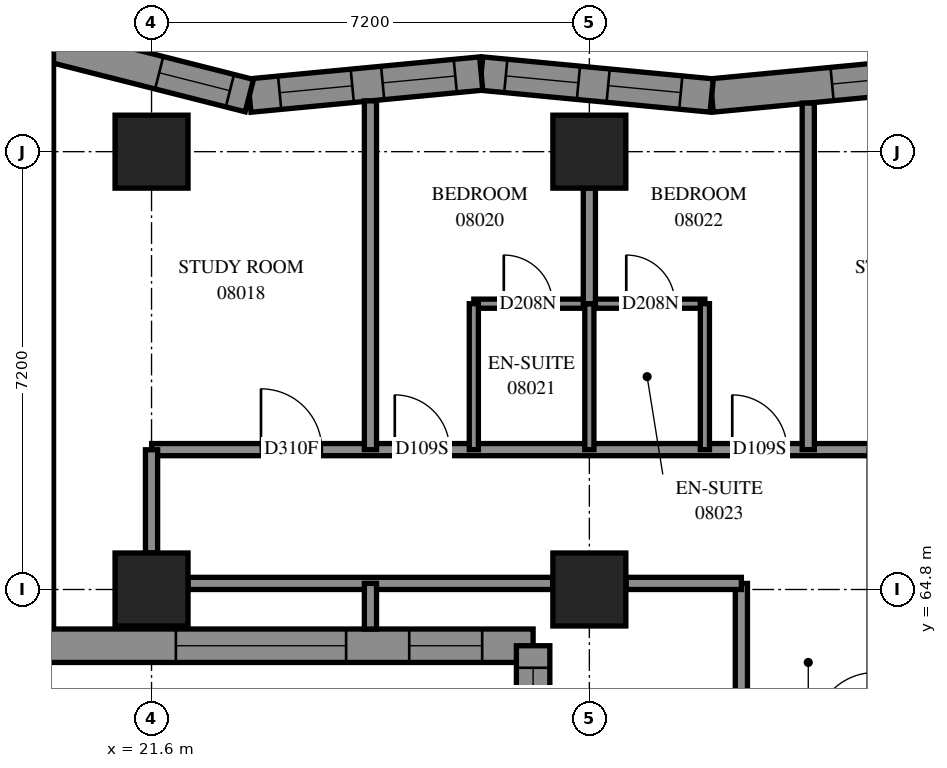
"""IFC4 building model, lengths in metres.
Left out: names, types, materials, properties, quantities, classifications, styles, units other than length and angle.
Written with IfcOpenShell. Run it as: python <this file> out.ifc"""

import sys

from ifc_helpers import new_model, si_unit, direction, frame, frame_2d, origin, origin_2d, place, context, subcontext, project, spatial, polyline, rectangle, outline, extrude, element, fill, save


model = new_model("IFC4")
c1 = context("Model", 3, precision=1e-05, world=origin(), true_north=direction((0.0, 1.0)))
c2 = subcontext(c1, "Body", "Model", "MODEL_VIEW")
j1 = project(units=[si_unit("LENGTHUNIT", "METRE"), si_unit("PLANEANGLEUNIT", "RADIAN")], contexts=[c1])
p1 = place(None, origin())
s1 = spatial("IfcSite", under=j1, at=p1, CompositionType="ELEMENT")
p2 = place(p1, origin())
s2 = spatial("IfcBuilding", under=s1, at=p2, CompositionType="ELEMENT")
p3 = place(p2, frame((0.0, 0.0, 33.8)))
s3 = spatial("IfcBuildingStorey", under=s2, at=p3, CompositionType="ELEMENT", Elevation=33.8)
for number, where, z_axis, x_axis in (
    (1, (21.6, 64.8, 0.0), (0.0, 0.0, 1.0), (1.0, 0.0, 0.0)),
    (2, (21.6, 72.0, 0.0), (0.0, 0.0, 1.0), (1.0, 0.0, 0.0)),
    (3, (28.8, 64.8, 0.0), (0.0, 0.0, 1.0), (1.0, 0.0, 0.0)),
    (4, (28.8, 72.0, 0.0), (0.0, 0.0, 1.0), (1.0, 0.0, 0.0)),
):
    element("IfcColumn", number, at=place(p3, frame(where, z_axis=z_axis, x_axis=x_axis)), inside=s3, PredefinedType="COLUMN", context=c2, shape_type="SweptSolid", body=[
        extrude(rectangle(XDim=1.2, YDim=1.2, at=origin_2d()), origin(), (0.0, 0.0, 1.0), 3.1),
    ])
p4 = place(p3, frame((34.603, 73.285, 0.0), z_axis=(0.0, 0.0, 1.0), x_axis=(-0.9954966527, -0.0947967005, 0.0)))
e5 = element("IfcWall", 5, at=p4, inside=s3, PredefinedType="SOLIDWALL", context=c2, shape_type="SweptSolid", body=[
    extrude(outline(polyline([(-0.026, -0.275), (3.782, -0.275), (3.834, 0.275), (0.026, 0.275), (-0.026, -0.275)])), origin(), (0.0, 0.0, 1.0), 3.1),
])
p5 = place(p4, frame((0.62, 0.0, 0.5)))
e6 = element("IfcOpeningElement", 6, at=p5, cuts=e5, PredefinedType="OPENING", context=c2, shape_type="SweptSolid", body=[
    extrude(rectangle(XDim=1.2, YDim=2.45, at=frame_2d((0.6, 1.225))), frame((0.0, 0.285, 0.0), z_axis=(0.0, -1.0, 0.0), x_axis=(1.0, 0.0, 0.0)), (0.0, 0.0, 1.0), 0.57),
])
p6 = place(p3, frame((30.812, 72.924, 0.0), z_axis=(0.0, 0.0, 1.0), x_axis=(-0.9954966527, 0.0947967005, 0.0)))
e7 = element("IfcWall", 7, at=p6, inside=s3, PredefinedType="SOLIDWALL", context=c2, shape_type="SweptSolid", body=[
    extrude(outline(polyline([(0.026, -0.275), (3.834, -0.275), (3.782, 0.275), (-0.026, 0.275), (0.026, -0.275)])), origin(), (0.0, 0.0, 1.0), 3.1),
])
p7 = place(p6, frame((0.511, 0.0, 0.5)))
e8 = element("IfcOpeningElement", 8, at=p7, cuts=e7, PredefinedType="OPENING", context=c2, shape_type="SweptSolid", body=[
    extrude(rectangle(XDim=1.2, YDim=2.45, at=frame_2d((0.6, 1.225))), frame((0.0, 0.285, 0.0), z_axis=(0.0, -1.0, 0.0), x_axis=(1.0, 0.0, 0.0)), (0.0, 0.0, 1.0), 0.57),
])
p8 = place(p6, frame((2.202, 0.0, 0.5)))
e9 = element("IfcOpeningElement", 9, at=p8, cuts=e7, PredefinedType="OPENING", context=c2, shape_type="SweptSolid", body=[
    extrude(rectangle(XDim=1.2, YDim=2.45, at=frame_2d((0.6, 1.225))), frame((0.0, 0.285, 0.0), z_axis=(0.0, -1.0, 0.0), x_axis=(1.0, 0.0, 0.0)), (0.0, 0.0, 1.0), 0.57),
])
p9 = place(p3, frame((27.021, 73.285, 0.0), z_axis=(0.0, 0.0, 1.0), x_axis=(-0.9954951205, -0.0948127894, 0.0)))
e10 = element("IfcWall", 10, at=p9, inside=s3, PredefinedType="SOLIDWALL", context=c2, shape_type="SweptSolid", body=[
    extrude(outline(polyline([(-0.026, -0.275), (3.782, -0.275), (3.877, 0.275), (0.026, 0.275), (-0.026, -0.275)])), origin(), (0.0, 0.0, 1.0), 3.1),
])
p10 = place(p9, frame((0.428, 0.0, 0.5)))
e11 = element("IfcOpeningElement", 11, at=p10, cuts=e10, PredefinedType="OPENING", context=c2, shape_type="SweptSolid", body=[
    extrude(rectangle(XDim=1.2, YDim=2.45, at=frame_2d((0.6, 1.225))), frame((0.0, 0.285, 0.0), z_axis=(0.0, -1.0, 0.0), x_axis=(1.0, 0.0, 0.0)), (0.0, 0.0, 1.0), 0.57),
])
p11 = place(p9, frame((2.129, 0.0, 0.5)))
e12 = element("IfcOpeningElement", 12, at=p11, cuts=e10, PredefinedType="OPENING", context=c2, shape_type="SweptSolid", body=[
    extrude(rectangle(XDim=1.2, YDim=2.45, at=frame_2d((0.6, 1.225))), frame((0.0, 0.285, 0.0), z_axis=(0.0, -1.0, 0.0), x_axis=(1.0, 0.0, 0.0)), (0.0, 0.0, 1.0), 0.57),
])
p12 = place(p3, frame((23.209, 72.922, 0.0), z_axis=(0.0, 0.0, 1.0), x_axis=(-0.9693377173, 0.2457323539, 0.0)))
e13 = element("IfcWall", 13, at=p12, inside=s3, PredefinedType="SOLIDWALL", context=c2, shape_type="SweptSolid", body=[
    extrude(outline(polyline([(0.048, -0.275), (3.959, -0.275), (3.252, 0.275), (-0.048, 0.275), (0.048, -0.275)])), origin(), (0.0, 0.0, 1.0), 3.1),
])
p13 = place(p12, frame((0.33, 0.0, 0.5)))
e14 = element("IfcOpeningElement", 14, at=p13, cuts=e13, PredefinedType="OPENING", context=c2, shape_type="SweptSolid", body=[
    extrude(rectangle(XDim=1.2, YDim=2.45, at=frame_2d((0.6, 1.225))), frame((0.0, 0.285, 0.0), z_axis=(0.0, -1.0, 0.0), x_axis=(1.0, 0.0, 0.0)), (0.0, 0.0, 1.0), 0.57),
])
p14 = place(p3, frame((19.714, 73.808, 0.0), z_axis=(0.0, 0.0, 1.0), x_axis=(0.0, -1.0, 0.0)))
e15 = element("IfcWall", 15, at=p14, inside=s3, PredefinedType="SOLIDWALL", context=c2, shape_type="SweptSolid", body=[
    extrude(outline(polyline([(-0.353, -0.275), (10.208, -0.275), (9.658, 0.275), (0.353, 0.275), (-0.353, -0.275)])), origin(), (0.0, 0.0, 1.0), 3.1),
])
p15 = place(p14, frame((2.208, 0.0, 0.5)))
e16 = element("IfcOpeningElement", 16, at=p15, cuts=e15, PredefinedType="OPENING", context=c2, shape_type="SweptSolid", body=[
    extrude(rectangle(XDim=2.8, YDim=2.45, at=frame_2d((1.4, 1.225))), frame((0.0, 0.285, 0.0), z_axis=(0.0, -1.0, 0.0), x_axis=(1.0, 0.0, 0.0)), (0.0, 0.0, 1.0), 0.57),
])
p16 = place(p14, frame((5.808, 0.0, 0.5)))
e17 = element("IfcOpeningElement", 17, at=p16, cuts=e15, PredefinedType="OPENING", context=c2, shape_type="SweptSolid", body=[
    extrude(rectangle(XDim=2.8, YDim=2.45, at=frame_2d((1.4, 1.225))), frame((0.0, 0.285, 0.0), z_axis=(0.0, -1.0, 0.0), x_axis=(1.0, 0.0, 0.0)), (0.0, 0.0, 1.0), 0.57),
])
p17 = place(p3, frame((19.714, 63.875, 0.0), z_axis=(0.0, 0.0, 1.0), x_axis=(1.0, 0.0, 0.0)))
e18 = element("IfcWall", 18, at=p17, inside=s3, PredefinedType="SOLIDWALL", context=c2, shape_type="SweptSolid", body=[
    extrude(outline(polyline([(-0.275, -0.275), (7.886, -0.275), (8.436, 0.275), (0.275, 0.275), (-0.275, -0.275)])), origin(), (0.0, 0.0, 1.0), 3.1),
])
p18 = place(p17, frame((2.286, 0.0, 0.5)))
e19 = element("IfcOpeningElement", 19, at=p18, cuts=e18, PredefinedType="OPENING", context=c2, shape_type="SweptSolid", body=[
    extrude(rectangle(XDim=2.8, YDim=2.45, at=frame_2d((1.4, 1.225))), frame((0.0, 0.285, 0.0), z_axis=(0.0, -1.0, 0.0), x_axis=(1.0, 0.0, 0.0)), (0.0, 0.0, 1.0), 0.57),
])
p19 = place(p17, frame((6.123, 0.0, 0.5)))
e20 = element("IfcOpeningElement", 20, at=p19, cuts=e18, PredefinedType="OPENING", context=c2, shape_type="SweptSolid", body=[
    extrude(rectangle(XDim=1.2, YDim=2.45, at=frame_2d((0.6, 1.225))), frame((0.0, 0.285, 0.0), z_axis=(0.0, -1.0, 0.0), x_axis=(1.0, 0.0, 0.0)), (0.0, 0.0, 1.0), 0.57),
])
p20 = place(p3, frame((27.875, 63.875, 0.0), z_axis=(0.0, 0.0, 1.0), x_axis=(0.0, -1.0, 0.0)))
e21 = element("IfcWall", 21, at=p20, inside=s3, PredefinedType="SOLIDWALL", context=c2, shape_type="SweptSolid", body=[
    extrude(outline(polyline([(0.275, -0.275), (7.475, -0.275), (6.925, 0.275), (-0.275, 0.275), (0.275, -0.275)])), origin(), (0.0, 0.0, 1.0), 3.1),
])
p21 = place(p20, frame((3.975, 0.0, 0.7)))
e22 = element("IfcOpeningElement", 22, at=p21, cuts=e21, PredefinedType="OPENING", context=c2, shape_type="SweptSolid", body=[
    extrude(rectangle(XDim=1.8, YDim=2.2, at=frame_2d((0.9, 1.1))), frame((0.0, 0.285, 0.0), z_axis=(0.0, -1.0, 0.0), x_axis=(1.0, 0.0, 0.0)), (0.0, 0.0, 1.0), 0.57),
])
p22 = place(p20, frame((0.362, 0.0, 0.45)))
e23 = element("IfcOpeningElement", 23, at=p22, cuts=e21, PredefinedType="OPENING", context=c2, shape_type="SweptSolid", body=[
    extrude(rectangle(XDim=1.0, YDim=2.5, at=frame_2d((0.5, 1.25))), frame((0.0, 0.285, 0.0), z_axis=(0.0, -1.0, 0.0), x_axis=(1.0, 0.0, 0.0)), (0.0, 0.0, 1.0), 0.57),
])
p23 = place(p20, frame((2.2, 0.0, 0.5)))
e24 = element("IfcOpeningElement", 24, at=p23, cuts=e21, PredefinedType="OPENING", context=c2, shape_type="SweptSolid", body=[
    extrude(rectangle(XDim=1.2, YDim=2.45, at=frame_2d((0.6, 1.225))), frame((0.0, 0.285, 0.0), z_axis=(0.0, -1.0, 0.0), x_axis=(1.0, 0.0, 0.0)), (0.0, 0.0, 1.0), 0.57),
])
p24 = place(p3, frame((21.602, 67.1, 0.0), z_axis=(0.0, 0.0, 1.0), x_axis=(1.0, 0.0, 0.0)))
e25 = element("IfcWall", 25, at=p24, inside=s3, PredefinedType="PARTITIONING", context=c2, shape_type="SweptSolid", body=[
    extrude(rectangle(XDim=11.898, YDim=0.2, at=frame_2d((5.949, 0.0))), origin(), (0.0, 0.0, 1.0), 3.1),
])
p25 = place(p24, frame((1.798, 0.0, 0.0)))
e26 = element("IfcOpeningElement", 26, at=p25, cuts=e25, PredefinedType="OPENING", context=c2, shape_type="SweptSolid", body=[
    extrude(rectangle(XDim=1.0, YDim=2.1, at=frame_2d((0.5, 1.05))), frame((0.0, 0.11, 0.0), z_axis=(0.0, -1.0, 0.0), x_axis=(1.0, 0.0, 0.0)), (0.0, 0.0, 1.0), 0.22),
])
p26 = place(p24, frame((3.998, 0.0, 0.0)))
e27 = element("IfcOpeningElement", 27, at=p26, cuts=e25, PredefinedType="OPENING", context=c2, shape_type="SweptSolid", body=[
    extrude(rectangle(XDim=0.9, YDim=2.1, at=frame_2d((0.45, 1.05))), frame((0.0, 0.11, 0.0), z_axis=(0.0, -1.0, 0.0), x_axis=(1.0, 0.0, 0.0)), (0.0, 0.0, 1.0), 0.22),
])
p27 = place(p24, frame((9.548, 0.0, 0.0)))
e28 = element("IfcOpeningElement", 28, at=p27, cuts=e25, PredefinedType="OPENING", context=c2, shape_type="SweptSolid", body=[
    extrude(rectangle(XDim=0.9, YDim=2.1, at=frame_2d((0.45, 1.05))), frame((0.0, 0.11, 0.0), z_axis=(0.0, -1.0, 0.0), x_axis=(1.0, 0.0, 0.0)), (0.0, 0.0, 1.0), 0.22),
])
p28 = place(p3, frame((22.2, 64.9, 0.0), z_axis=(0.0, 0.0, 1.0), x_axis=(1.0, 0.0, 0.0)))
e29 = element("IfcWall", 29, at=p28, inside=s3, PredefinedType="PARTITIONING", context=c2, shape_type="SweptSolid", body=[
    extrude(rectangle(XDim=6.0, YDim=0.2, at=frame_2d((3.0, 0.0))), origin(), (0.0, 0.0, 1.0), 2.6),
])
p29 = place(p3, frame((25.2, 67.1, 0.0), z_axis=(0.0, 0.0, 1.0), x_axis=(0.0, 1.0, 0.0)))
e30 = element("IfcWall", 30, at=p29, inside=s3, PredefinedType="PARTITIONING", context=c2, shape_type="SweptSolid", body=[
    extrude(rectangle(XDim=5.735, YDim=0.2, at=frame_2d((2.868, 0.0))), origin(), (0.0, 0.0, 1.0), 3.1),
])
p30 = place(p3, frame((32.4, 67.1, 0.0), z_axis=(0.0, 0.0, 1.0), x_axis=(0.0, 1.0, 0.0)))
e31 = element("IfcWall", 31, at=p30, inside=s3, PredefinedType="PARTITIONING", context=c2, shape_type="SweptSolid", body=[
    extrude(rectangle(XDim=5.699, YDim=0.2, at=frame_2d((2.849, 0.0))), origin(), (0.0, 0.0, 1.0), 3.1),
])
p31 = place(p3, frame((26.9, 69.5, 0.0), z_axis=(0.0, 0.0, 1.0), x_axis=(1.0, 0.0, 0.0)))
e32 = element("IfcWall", 32, at=p31, inside=s3, PredefinedType="PARTITIONING", context=c2, shape_type="SweptSolid", body=[
    extrude(rectangle(XDim=3.8, YDim=0.15, at=frame_2d((1.9, 0.0))), origin(), (0.0, 0.0, 1.0), 3.1),
])
p32 = place(p31, frame((0.493, 0.0, 0.0)))
e33 = element("IfcOpeningElement", 33, at=p32, cuts=e32, PredefinedType="OPENING", context=c2, shape_type="SweptSolid", body=[
    extrude(rectangle(XDim=0.8, YDim=2.1, at=frame_2d((0.4, 1.05))), frame((0.0, 0.085, 0.0), z_axis=(0.0, -1.0, 0.0), x_axis=(1.0, 0.0, 0.0)), (0.0, 0.0, 1.0), 0.17),
])
p33 = place(p31, frame((2.507, 0.0, 0.0)))
e34 = element("IfcOpeningElement", 34, at=p33, cuts=e32, PredefinedType="OPENING", context=c2, shape_type="SweptSolid", body=[
    extrude(rectangle(XDim=0.8, YDim=2.1, at=frame_2d((0.4, 1.05))), frame((0.0, 0.085, 0.0), z_axis=(0.0, -1.0, 0.0), x_axis=(1.0, 0.0, 0.0)), (0.0, 0.0, 1.0), 0.17),
])
p34 = place(p3, frame((31.3, 62.302, 0.0), z_axis=(0.0, 0.0, 1.0), x_axis=(0.0, 1.0, 0.0)))
e35 = element("IfcWall", 35, at=p34, inside=s3, PredefinedType="PARTITIONING", context=c2, shape_type="SweptSolid", body=[
    extrude(rectangle(XDim=2.598, YDim=0.2, at=frame_2d((1.299, 0.0))), origin(), (0.0, 0.0, 1.0), 3.1),
])
for number, where, z_axis, x_axis in (
    (36, (26.9, 67.1, 0.0), (0.0, 0.0, 1.0), (0.0, 1.0, 0.0)),
    (37, (28.8, 67.1, 0.0), (0.0, 0.0, 1.0), (0.0, 1.0, 0.0)),
    (38, (30.7, 67.1, 0.0), (0.0, 0.0, 1.0), (0.0, 1.0, 0.0)),
):
    element("IfcWall", number, at=place(p3, frame(where, z_axis=z_axis, x_axis=x_axis)), inside=s3, PredefinedType="PARTITIONING", context=c2, shape_type="SweptSolid", body=[
        extrude(rectangle(XDim=2.4, YDim=0.15, at=frame_2d((1.2, 0.0))), origin(), (0.0, 0.0, 1.0), 3.1),
    ])
for number, where, z_axis, x_axis in (
    (39, (28.8, 69.5, 0.0), (0.0, 0.0, 1.0), (0.0, 1.0, 0.0)),
    (40, (29.4, 64.9, 0.0), (0.0, 0.0, 1.0), (1.0, 0.0, 0.0)),
):
    element("IfcWall", number, at=place(p3, frame(where, z_axis=z_axis, x_axis=x_axis)), inside=s3, PredefinedType="PARTITIONING", context=c2, shape_type="SweptSolid", body=[
        extrude(rectangle(XDim=1.9, YDim=0.2, at=frame_2d((0.95, 0.0))), origin(), (0.0, 0.0, 1.0), 3.1),
    ])
p35 = place(p3, frame((21.6, 65.4, 0.0), z_axis=(0.0, 0.0, 1.0), x_axis=(0.0, 1.0, 0.0)))
e41 = element("IfcWall", 41, at=p35, inside=s3, PredefinedType="PARTITIONING", context=c2, shape_type="SweptSolid", body=[
    extrude(rectangle(XDim=1.698, YDim=0.2, at=frame_2d((0.849, 0.0))), origin(), (0.0, 0.0, 1.0), 2.6),
])
p36 = place(p3, frame((25.2, 64.15, 0.0), z_axis=(0.0, 0.0, 1.0), x_axis=(0.0, 1.0, 0.0)))
e42 = element("IfcWall", 42, at=p36, inside=s3, PredefinedType="PARTITIONING", context=c2, shape_type="SweptSolid", body=[
    extrude(rectangle(XDim=0.75, YDim=0.2, at=frame_2d((0.375, 0.0))), origin(), (0.0, 0.0, 1.0), 3.1),
])
p37 = place(p3, frame((28.2, 64.9, 0.0), z_axis=(0.0, 0.0, 1.0), x_axis=(1.0, 0.0, 0.0)))
e43 = element("IfcWall", 43, at=p37, inside=s3, PredefinedType="PARTITIONING", context=c2, shape_type="SweptSolid", body=[
    extrude(rectangle(XDim=1.2, YDim=0.2, at=frame_2d((0.6, 0.0))), origin(), (0.0, 0.0, 1.0), 3.1),
])
p38 = place(p5, origin())
e44 = element("IfcWindow", 44, at=p38, inside=s3, PartitioningType="SINGLE_PANEL", PredefinedType="WINDOW", context=c2, shape_type="SweptSolid", body=[
    extrude(rectangle(XDim=1.2, YDim=2.45, at=frame_2d((0.6, 1.225))), frame((0.0, 0.155, 0.0), z_axis=(0.0, -1.0, 0.0), x_axis=(1.0, 0.0, 0.0)), (0.0, 0.0, 1.0), 0.06),
])
fill(e6, e44)
p39 = place(p7, origin())
e45 = element("IfcWindow", 45, at=p39, inside=s3, PartitioningType="SINGLE_PANEL", PredefinedType="WINDOW", context=c2, shape_type="SweptSolid", body=[
    extrude(rectangle(XDim=1.2, YDim=2.45, at=frame_2d((0.6, 1.225))), frame((0.0, 0.155, 0.0), z_axis=(0.0, -1.0, 0.0), x_axis=(1.0, 0.0, 0.0)), (0.0, 0.0, 1.0), 0.06),
])
fill(e8, e45)
p40 = place(p8, origin())
e46 = element("IfcWindow", 46, at=p40, inside=s3, PartitioningType="SINGLE_PANEL", PredefinedType="WINDOW", context=c2, shape_type="SweptSolid", body=[
    extrude(rectangle(XDim=1.2, YDim=2.45, at=frame_2d((0.6, 1.225))), frame((0.0, 0.155, 0.0), z_axis=(0.0, -1.0, 0.0), x_axis=(1.0, 0.0, 0.0)), (0.0, 0.0, 1.0), 0.06),
])
fill(e9, e46)
p41 = place(p10, origin())
e47 = element("IfcWindow", 47, at=p41, inside=s3, PartitioningType="SINGLE_PANEL", PredefinedType="WINDOW", context=c2, shape_type="SweptSolid", body=[
    extrude(rectangle(XDim=1.2, YDim=2.45, at=frame_2d((0.6, 1.225))), frame((0.0, 0.155, 0.0), z_axis=(0.0, -1.0, 0.0), x_axis=(1.0, 0.0, 0.0)), (0.0, 0.0, 1.0), 0.06),
])
fill(e11, e47)
p42 = place(p11, origin())
e48 = element("IfcWindow", 48, at=p42, inside=s3, PartitioningType="SINGLE_PANEL", PredefinedType="WINDOW", context=c2, shape_type="SweptSolid", body=[
    extrude(rectangle(XDim=1.2, YDim=2.45, at=frame_2d((0.6, 1.225))), frame((0.0, 0.155, 0.0), z_axis=(0.0, -1.0, 0.0), x_axis=(1.0, 0.0, 0.0)), (0.0, 0.0, 1.0), 0.06),
])
fill(e12, e48)
p43 = place(p13, origin())
e49 = element("IfcWindow", 49, at=p43, inside=s3, PartitioningType="SINGLE_PANEL", PredefinedType="WINDOW", context=c2, shape_type="SweptSolid", body=[
    extrude(rectangle(XDim=1.2, YDim=2.45, at=frame_2d((0.6, 1.225))), frame((0.0, 0.155, 0.0), z_axis=(0.0, -1.0, 0.0), x_axis=(1.0, 0.0, 0.0)), (0.0, 0.0, 1.0), 0.06),
])
fill(e14, e49)
p44 = place(p18, origin())
e50 = element("IfcWindow", 50, at=p44, inside=s3, PartitioningType="SINGLE_PANEL", PredefinedType="WINDOW", context=c2, shape_type="SweptSolid", body=[
    extrude(rectangle(XDim=2.8, YDim=2.45, at=frame_2d((1.4, 1.225))), frame((0.0, 0.155, 0.0), z_axis=(0.0, -1.0, 0.0), x_axis=(1.0, 0.0, 0.0)), (0.0, 0.0, 1.0), 0.06),
])
fill(e19, e50)
p45 = place(p19, origin())
e51 = element("IfcWindow", 51, at=p45, inside=s3, PartitioningType="SINGLE_PANEL", PredefinedType="WINDOW", context=c2, shape_type="SweptSolid", body=[
    extrude(rectangle(XDim=1.2, YDim=2.45, at=frame_2d((0.6, 1.225))), frame((0.0, 0.155, 0.0), z_axis=(0.0, -1.0, 0.0), x_axis=(1.0, 0.0, 0.0)), (0.0, 0.0, 1.0), 0.06),
])
fill(e20, e51)
p46 = place(p25, origin())
e52 = element("IfcDoor", 52, at=p46, inside=s3, OperationType="SINGLE_SWING_RIGHT", PredefinedType="DOOR", context=c2, shape_type="SweptSolid", body=[
    extrude(rectangle(XDim=1.0, YDim=2.1, at=frame_2d((0.5, 1.05))), frame((0.0, 0.025, 0.0), z_axis=(0.0, -1.0, 0.0), x_axis=(1.0, 0.0, 0.0)), (0.0, 0.0, 1.0), 0.05),
])
fill(e26, e52)
p47 = place(p26, origin())
e53 = element("IfcDoor", 53, at=p47, inside=s3, OperationType="SINGLE_SWING_LEFT", PredefinedType="DOOR", context=c2, shape_type="SweptSolid", body=[
    extrude(rectangle(XDim=0.9, YDim=2.1, at=frame_2d((0.45, 1.05))), frame((0.0, 0.025, 0.0), z_axis=(0.0, -1.0, 0.0), x_axis=(1.0, 0.0, 0.0)), (0.0, 0.0, 1.0), 0.05),
])
fill(e27, e53)
p48 = place(p32, origin())
e54 = element("IfcDoor", 54, at=p48, inside=s3, OperationType="SINGLE_SWING_RIGHT", PredefinedType="DOOR", context=c2, shape_type="SweptSolid", body=[
    extrude(rectangle(XDim=0.8, YDim=2.1, at=frame_2d((0.4, 1.05))), frame((0.0, 0.025, 0.0), z_axis=(0.0, -1.0, 0.0), x_axis=(1.0, 0.0, 0.0)), (0.0, 0.0, 1.0), 0.05),
])
fill(e33, e54)
p49 = place(p27, origin())
e55 = element("IfcDoor", 55, at=p49, inside=s3, OperationType="SINGLE_SWING_RIGHT", PredefinedType="DOOR", context=c2, shape_type="SweptSolid", body=[
    extrude(rectangle(XDim=0.9, YDim=2.1, at=frame_2d((0.45, 1.05))), frame((0.0, 0.025, 0.0), z_axis=(0.0, -1.0, 0.0), x_axis=(1.0, 0.0, 0.0)), (0.0, 0.0, 1.0), 0.05),
])
fill(e28, e55)
p50 = place(p33, origin())
e56 = element("IfcDoor", 56, at=p50, inside=s3, OperationType="SINGLE_SWING_RIGHT", PredefinedType="DOOR", context=c2, shape_type="SweptSolid", body=[
    extrude(rectangle(XDim=0.8, YDim=2.1, at=frame_2d((0.4, 1.05))), frame((0.0, 0.025, 0.0), z_axis=(0.0, -1.0, 0.0), x_axis=(1.0, 0.0, 0.0)), (0.0, 0.0, 1.0), 0.05),
])
fill(e34, e56)
p51 = place(p22, origin())
e57 = element("IfcWindow", 57, at=p51, inside=s3, PartitioningType="SINGLE_PANEL", PredefinedType="WINDOW", context=c2, shape_type="SweptSolid", body=[
    extrude(rectangle(XDim=1.0, YDim=2.5, at=frame_2d((0.5, 1.25))), frame((0.0, 0.155, 0.0), z_axis=(0.0, -1.0, 0.0), x_axis=(1.0, 0.0, 0.0)), (0.0, 0.0, 1.0), 0.06),
])
fill(e23, e57)
save(model, sys.argv[1])
